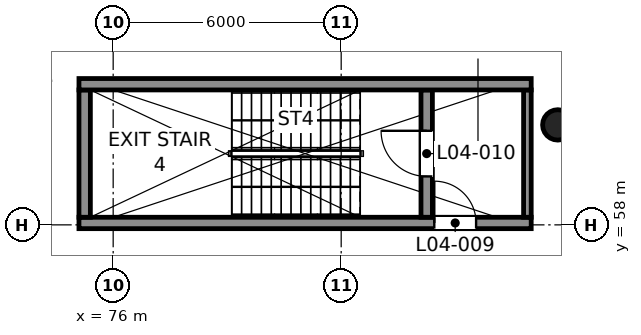
"""IFC4 building model, lengths in metres.
Left out: names, types, materials, properties, quantities, classifications, styles, units other than length and angle.
Written with IfcOpenShell. Run it as: python <this file> out.ifc"""

import sys

from ifc_helpers import new_model, si_unit, direction, frame, frame_2d, origin, origin_2d, place, context, subcontext, project, spatial, rectangle, circle, extrude, element, fill, save


model = new_model("IFC4")
c1 = context("Model", 3, precision=1e-05, world=origin(), true_north=direction((0.0, 1.0)))
c2 = subcontext(c1, "Body", "Model", "MODEL_VIEW")
j1 = project(units=[si_unit("LENGTHUNIT", "METRE"), si_unit("PLANEANGLEUNIT", "RADIAN")], contexts=[c1])
p1 = place(None, origin())
s1 = spatial("IfcSite", under=j1, at=p1, CompositionType="ELEMENT")
p2 = place(p1, origin())
s2 = spatial("IfcBuilding", under=s1, at=p2, CompositionType="ELEMENT")
p3 = place(p2, frame((0.0, 0.0, 29.0)))
s3 = spatial("IfcBuildingStorey", under=s2, at=p3, CompositionType="ELEMENT", Elevation=29.0)
p4 = place(p3, frame((87.7, 60.63, 0.0), z_axis=(0.0, 0.0, 1.0), x_axis=(1.0, 0.0, 0.0)))
e1 = element("IfcColumn", 1, at=p4, inside=s3, PredefinedType="COLUMN", context=c2, shape_type="SweptSolid", body=[
    extrude(circle(Radius=0.4, at=origin_2d()), origin(), (0.0, 0.0, 1.0), 5.0),
])
p5 = place(p3, frame((75.1, 58.05, 0.0), z_axis=(0.0, 0.0, 1.0), x_axis=(1.0, 0.0, 0.0)))
e2 = element("IfcWall", 2, at=p5, inside=s3, PredefinedType="SHEAR", context=c2, shape_type="SweptSolid", body=[
    extrude(rectangle(XDim=11.9, YDim=0.3, at=frame_2d((5.95, 0.0))), origin(), (0.0, 0.0, 1.0), 5.0),
])
p6 = place(p5, frame((9.35, 0.0, 0.0)))
e3 = element("IfcOpeningElement", 3, at=p6, cuts=e2, PredefinedType="OPENING", context=c2, shape_type="SweptSolid", body=[
    extrude(rectangle(XDim=1.1, YDim=2.1, at=frame_2d((0.55, 1.05))), frame((0.0, 0.16, 0.0), z_axis=(0.0, -1.0, 0.0), x_axis=(1.0, 0.0, 0.0)), (0.0, 0.0, 1.0), 0.32),
])
p7 = place(p3, frame((75.25, 58.2, 0.0), z_axis=(0.0, 0.0, 1.0), x_axis=(0.0, 1.0, 0.0)))
e4 = element("IfcWall", 4, at=p7, inside=s3, PredefinedType="SHEAR", context=c2, shape_type="SweptSolid", body=[
    extrude(rectangle(XDim=3.35, YDim=0.3, at=frame_2d((1.675, 0.0))), origin(), (0.0, 0.0, 1.0), 5.0),
])
p8 = place(p3, frame((84.25, 58.2, 0.0), z_axis=(0.0, 0.0, 1.0), x_axis=(0.0, 1.0, 0.0)))
e5 = element("IfcWall", 5, at=p8, inside=s3, PredefinedType="SHEAR", context=c2, shape_type="SweptSolid", body=[
    extrude(rectangle(XDim=3.35, YDim=0.3, at=frame_2d((1.675, 0.0))), origin(), (0.0, 0.0, 1.0), 5.0),
])
p9 = place(p8, frame((1.075, 0.0, 0.0)))
e6 = element("IfcOpeningElement", 6, at=p9, cuts=e5, PredefinedType="OPENING", context=c2, shape_type="SweptSolid", body=[
    extrude(rectangle(XDim=1.2, YDim=2.1, at=frame_2d((0.6, 1.05))), frame((0.0, 0.16, 0.0), z_axis=(0.0, -1.0, 0.0), x_axis=(1.0, 0.0, 0.0)), (0.0, 0.0, 1.0), 0.32),
])
p10 = place(p3, frame((86.9, 58.2, 0.0), z_axis=(0.0, 0.0, 1.0), x_axis=(0.0, 1.0, 0.0)))
e7 = element("IfcWall", 7, at=p10, inside=s3, PredefinedType="SHEAR", context=c2, shape_type="SweptSolid", body=[
    extrude(rectangle(XDim=3.35, YDim=0.2, at=frame_2d((1.675, 0.0))), origin(), (0.0, 0.0, 1.0), 5.0),
])
p11 = place(p3, frame((75.1, 61.7, 0.0), z_axis=(0.0, 0.0, 1.0), x_axis=(1.0, 0.0, 0.0)))
e8 = element("IfcWall", 8, at=p11, inside=s3, PredefinedType="SHEAR", context=c2, shape_type="SweptSolid", body=[
    extrude(rectangle(XDim=11.9, YDim=0.3, at=frame_2d((5.95, 0.0))), origin(), (0.0, 0.0, 1.0), 5.0),
])
p12 = place(p3, frame((87.504, 74.848, 0.0), z_axis=(0.0, 0.0, 1.0), x_axis=(0.309027605618, -0.951053068428, 0.0)))
e9 = element("IfcWall", 9, at=p12, inside=s3, PredefinedType="PARTITIONING", context=c2, shape_type="SweptSolid", body=[
    extrude(rectangle(XDim=15.013, YDim=0.2, at=frame_2d((7.506, 0.0))), origin(), (0.0, 0.0, 1.0), 4.65),
])
p13 = place(p12, frame((12.527, 0.0, 0.0)))
e10 = element("IfcOpeningElement", 10, at=p13, cuts=e9, PredefinedType="OPENING", context=c2, shape_type="SweptSolid", body=[
    extrude(rectangle(XDim=0.9, YDim=2.1, at=frame_2d((0.45, 1.05))), frame((0.0, 0.11, 0.0), z_axis=(0.0, -1.0, 0.0), x_axis=(1.0, 0.0, 0.0)), (0.0, 0.0, 1.0), 0.22),
])
p14 = place(p12, frame((8.958, 0.0, 0.0)))
e11 = element("IfcOpeningElement", 11, at=p14, cuts=e9, PredefinedType="OPENING", context=c2, shape_type="SweptSolid", body=[
    extrude(rectangle(XDim=0.9, YDim=2.1, at=frame_2d((0.45, 1.05))), frame((0.0, 0.11, 0.0), z_axis=(0.0, -1.0, 0.0), x_axis=(1.0, 0.0, 0.0)), (0.0, 0.0, 1.0), 0.22),
])
p15 = place(p12, frame((4.458, 0.0, 0.0)))
e12 = element("IfcOpeningElement", 12, at=p15, cuts=e9, PredefinedType="OPENING", context=c2, shape_type="SweptSolid", body=[
    extrude(rectangle(XDim=0.9, YDim=2.1, at=frame_2d((0.45, 1.05))), frame((0.0, 0.11, 0.0), z_axis=(0.0, -1.0, 0.0), x_axis=(1.0, 0.0, 0.0)), (0.0, 0.0, 1.0), 0.22),
])
p16 = place(p12, frame((0.183, 0.0, 0.0)))
e13 = element("IfcOpeningElement", 13, at=p16, cuts=e9, PredefinedType="OPENING", context=c2, shape_type="SweptSolid", body=[
    extrude(rectangle(XDim=0.9, YDim=2.1, at=frame_2d((0.45, 1.05))), frame((0.0, 0.11, 0.0), z_axis=(0.0, -1.0, 0.0), x_axis=(1.0, 0.0, 0.0)), (0.0, 0.0, 1.0), 0.22),
])
p17 = place(p6, origin())
e14 = element("IfcDoor", 14, at=p17, inside=s3, OperationType="SINGLE_SWING_LEFT", PredefinedType="DOOR", context=c2, shape_type="SweptSolid", body=[
    extrude(rectangle(XDim=1.1, YDim=2.1, at=frame_2d((0.55, 1.05))), frame((0.0, 0.025, 0.0), z_axis=(0.0, -1.0, 0.0), x_axis=(1.0, 0.0, 0.0)), (0.0, 0.0, 1.0), 0.05),
])
fill(e3, e14)
p18 = place(p9, origin())
e15 = element("IfcDoor", 15, at=p18, inside=s3, OperationType="SINGLE_SWING_RIGHT", PredefinedType="DOOR", context=c2, shape_type="SweptSolid", body=[
    extrude(rectangle(XDim=1.2, YDim=2.1, at=frame_2d((0.6, 1.05))), frame((0.0, 0.025, 0.0), z_axis=(0.0, -1.0, 0.0), x_axis=(1.0, 0.0, 0.0)), (0.0, 0.0, 1.0), 0.05),
])
fill(e6, e15)
save(model, sys.argv[1])
